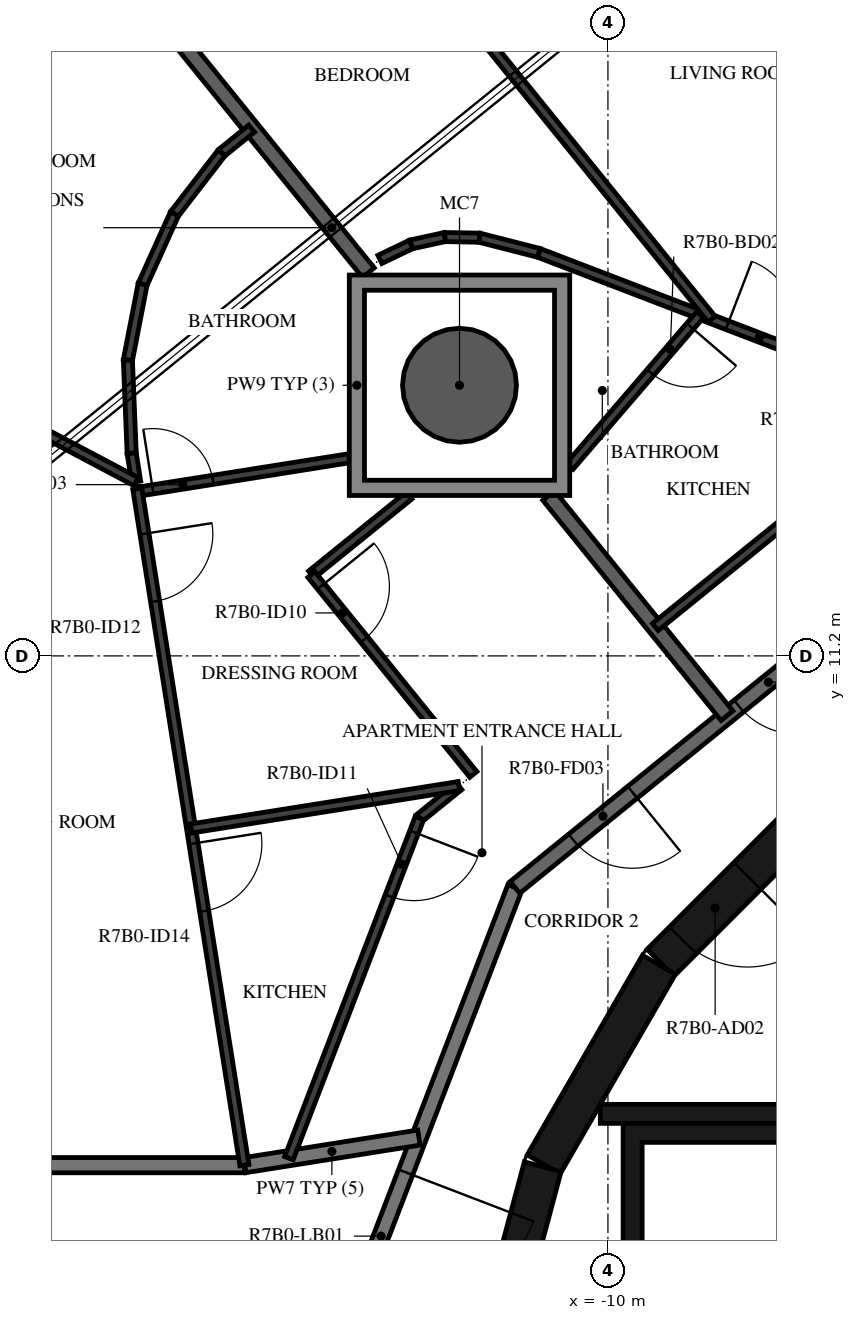
"""IFC4 building model, lengths in metres.
Left out: names, types, materials, properties, quantities, classifications, styles, units other than length and angle.
Written with IfcOpenShell. Run it as: python <this file> out.ifc"""

import sys

from ifc_helpers import new_model, si_unit, direction, frame, frame_2d, origin, origin_2d, place, context, subcontext, project, spatial, polyline, rectangle, hollow_circle, outline, extrude, element, fill, save


model = new_model("IFC4")
c1 = context("Model", 3, precision=1e-05, world=origin(), true_north=direction((0.0, 1.0)))
c2 = subcontext(c1, "Body", "Model", "MODEL_VIEW")
j1 = project(units=[si_unit("LENGTHUNIT", "METRE"), si_unit("PLANEANGLEUNIT", "RADIAN")], contexts=[c1])
p1 = place(None, origin())
s1 = spatial("IfcSite", under=j1, at=p1, CompositionType="ELEMENT")
p2 = place(p1, origin())
s2 = spatial("IfcBuilding", under=s1, at=p2, CompositionType="ELEMENT")
p3 = place(p2, frame((0.0, 0.0, 277.4)))
s3 = spatial("IfcBuildingStorey", under=s2, at=p3, CompositionType="ELEMENT", Elevation=277.4)
p4 = place(p3, frame((-11.953, 14.76, -0.38), z_axis=(0.0, 0.0, 1.0), x_axis=(1.0, 0.0, 0.0)))
e1 = element("IfcColumn", 1, at=p4, inside=s3, PredefinedType="COLUMN", context=c2, shape_type="SweptSolid", body=[
    extrude(hollow_circle(Radius=0.75, WallThickness=0.035, at=origin_2d()), origin(), (0.0, 0.0, 1.0), 3.5),
])
p5 = place(p3, frame((-7.164, 9.308, 0.0), z_axis=(0.0, 0.0, 1.0), x_axis=(-0.707106781187, -0.707106781187, 0.0)))
e2 = element("IfcWall", 2, at=p5, inside=s3, PredefinedType="SHEAR", context=c2, shape_type="SweptSolid", body=[
    extrude(rectangle(XDim=3.032, YDim=0.5, at=frame_2d((1.516, 0.0))), origin(), (0.0, 0.0, 1.0), 3.12),
])
p6 = place(p5, frame((1.416, 0.0, 0.0)))
e3 = element("IfcOpeningElement", 3, at=p6, cuts=e2, PredefinedType="OPENING", context=c2, shape_type="SweptSolid", body=[
    extrude(rectangle(XDim=1.2, YDim=2.1, at=frame_2d((0.6, 1.05))), frame((0.0, 0.26, 0.0), z_axis=(0.0, -1.0, 0.0), x_axis=(1.0, 0.0, 0.0)), (0.0, 0.0, 1.0), 0.52),
])
for number, where, z_axis, x_axis in (
    (4, (-9.329, 7.137, 0.0), (0.0, 0.0, 1.0), (-0.5, -0.866, 0.0)),
    (5, (-10.858, 4.479, 0.0), (0.0, 0.0, 1.0), (-0.259, -0.966, 0.0)),
):
    element("IfcWall", number, at=place(p3, frame(where, z_axis=z_axis, x_axis=x_axis)), inside=s3, PredefinedType="SHEAR", context=c2, shape_type="SweptSolid", body=[
        extrude(rectangle(XDim=3.033, YDim=0.5, at=frame_2d((1.516, 0.0))), origin(), (0.0, 0.0, 1.0), 3.12),
    ])
p7 = place(p3, frame((-7.0, 5.175, 0.0), z_axis=(0.0, 0.0, 1.0), x_axis=(-1.0, 0.0, 0.0)))
e6 = element("IfcWall", 6, at=p7, inside=s3, PredefinedType="SHEAR", context=c2, shape_type="SweptSolid", body=[
    extrude(rectangle(XDim=3.1, YDim=0.25, at=frame_2d((1.55, 0.0))), origin(), (0.0, 0.0, 1.0), 3.12),
])
p8 = place(p3, origin())
e7 = element("IfcWall", 7, at=p8, inside=s3, PredefinedType="SHEAR", context=c2, shape_type="SweptSolid", body=[
    extrude(outline(polyline([(-9.8, 1.9), (-9.55, 1.9), (-9.55, 4.8), (-5.5, 4.8), (-5.5, 1.9), (-5.25, 1.9), (-5.25, 4.8), (3.1, 4.8), (3.1, 1.9), (3.35, 1.9), (3.35, 4.8), (5.25, 4.8), (5.25, 1.9), (5.5, 1.9), (5.5, 4.8), (7.4, 4.8), (7.4, 1.9), (7.65, 1.9), (7.65, 4.8), (9.55, 4.8), (9.55, 1.9), (9.8, 1.9), (9.8, 4.8), (9.8, 5.05), (-9.8, 5.05), (-9.8, 4.8), (-9.8, 1.9)])), origin(), (0.0, 0.0, 1.0), 3.12),
])
p9 = place(p3, frame((-11.223, 8.154, 0.0), z_axis=(0.0, 0.0, 1.0), x_axis=(-0.358341090983, -0.93359073609, 0.0)))
e8 = element("IfcWall", 8, at=p9, inside=s3, PredefinedType="STANDARD", context=c2, shape_type="SweptSolid", body=[
    extrude(rectangle(XDim=7.181, YDim=0.2, at=frame_2d((3.59, 0.0))), origin(), (0.0, 0.0, 1.0), 3.12),
])
p10 = place(p9, frame((4.014, 0.0, 0.0)))
e9 = element("IfcOpeningElement", 9, at=p10, cuts=e8, PredefinedType="OPENING", context=c2, shape_type="SweptSolid", body=[
    extrude(rectangle(XDim=1.8, YDim=2.1, at=frame_2d((0.9, 1.05))), frame((0.0, 0.11, 0.0), z_axis=(0.0, -1.0, 0.0), x_axis=(1.0, 0.0, 0.0)), (0.0, 0.0, 1.0), 0.22),
])
p11 = place(p3, frame((-5.643, 12.673, 0.0), z_axis=(0.0, 0.0, 1.0), x_axis=(-0.777160148113, -0.629302871585, 0.0)))
e10 = element("IfcWall", 10, at=p11, inside=s3, PredefinedType="STANDARD", context=c2, shape_type="SweptSolid", body=[
    extrude(rectangle(XDim=7.181, YDim=0.2, at=frame_2d((3.59, 0.0))), origin(), (0.0, 0.0, 1.0), 3.12),
])
p12 = place(p11, frame((2.39, 0.0, 0.0)))
e11 = element("IfcOpeningElement", 11, at=p12, cuts=e10, PredefinedType="OPENING", context=c2, shape_type="SweptSolid", body=[
    extrude(rectangle(XDim=1.0, YDim=2.1, at=frame_2d((0.5, 1.05))), frame((0.0, 0.11, 0.0), z_axis=(0.0, -1.0, 0.0), x_axis=(1.0, 0.0, 0.0)), (0.0, 0.0, 1.0), 0.22),
])
p13 = place(p11, frame((5.192, 0.0, 0.0)))
e12 = element("IfcOpeningElement", 12, at=p13, cuts=e10, PredefinedType="OPENING", context=c2, shape_type="SweptSolid", body=[
    extrude(rectangle(XDim=1.0, YDim=2.1, at=frame_2d((0.5, 1.05))), frame((0.0, 0.11, 0.0), z_axis=(0.0, -1.0, 0.0), x_axis=(1.0, 0.0, 0.0)), (0.0, 0.0, 1.0), 0.22),
])
p14 = place(p3, frame((-12.487, 4.863, 0.0), z_axis=(0.0, 0.0, 1.0), x_axis=(-0.98769031179, -0.156422018898, 0.0)))
e13 = element("IfcWall", 13, at=p14, inside=s3, PredefinedType="STANDARD", context=c2, shape_type="SweptSolid", body=[
    extrude(rectangle(XDim=2.319, YDim=0.2, at=frame_2d((1.16, 0.0))), origin(), (0.0, 0.0, 1.0), 3.12),
])
p15 = place(p3, frame((-14.783, 4.5, 0.0), z_axis=(0.0, 0.0, 1.0), x_axis=(-1.0, 0.0, 0.0)))
e14 = element("IfcWall", 14, at=p15, inside=s3, PredefinedType="STANDARD", context=c2, shape_type="SweptSolid", body=[
    extrude(rectangle(XDim=3.645, YDim=0.2, at=frame_2d((1.822, 0.0))), origin(), (0.0, 0.0, 1.0), 3.12),
])
p16 = place(p3, frame((-10.779, 13.31, 0.0), z_axis=(0.0, 0.0, 1.0), x_axis=(0.62931692753, -0.777148766147, 0.0)))
e15 = element("IfcWall", 15, at=p16, inside=s3, PredefinedType="STANDARD", context=c2, shape_type="SweptSolid", body=[
    extrude(rectangle(XDim=3.727, YDim=0.2, at=frame_2d((1.864, 0.0))), origin(), (0.0, 0.0, 1.0), 3.12),
])
p17 = place(p3, frame((-16.953, 20.936, 0.0), z_axis=(0.0, 0.0, 1.0), x_axis=(0.629347053134, -0.77712437017, 0.0)))
e16 = element("IfcWall", 16, at=p17, inside=s3, PredefinedType="STANDARD", context=c2, shape_type="SweptSolid", body=[
    extrude(rectangle(XDim=6.04, YDim=0.2, at=frame_2d((3.02, 0.0))), origin(), (0.0, 0.0, 1.0), 3.12),
])
p18 = place(p3, frame((-6.274, 14.092, 0.0), z_axis=(0.0, 0.0, 1.0), x_axis=(-0.777162268892, -0.629300252511, 0.0)))
e17 = element("IfcWall", 17, at=p18, inside=s3, PredefinedType="PARTITIONING", context=c2, shape_type="SweptSolid", body=[
    extrude(rectangle(XDim=3.992, YDim=0.12, at=frame_2d((1.996, 0.0))), origin(), (0.0, 0.0, 1.0), 3.12),
])
p19 = place(p18, frame((0.2, 0.0, 0.0)))
e18 = element("IfcOpeningElement", 18, at=p19, cuts=e17, PredefinedType="OPENING", context=c2, shape_type="SweptSolid", body=[
    extrude(rectangle(XDim=0.9, YDim=2.1, at=frame_2d((0.45, 1.05))), frame((0.0, 0.07, 0.0), z_axis=(0.0, -1.0, 0.0), x_axis=(1.0, 0.0, 0.0)), (0.0, 0.0, 1.0), 0.14),
])
p20 = place(p3, frame((-10.91, 16.502, 0.0), z_axis=(0.0, 0.0, 1.0), x_axis=(0.933584453869, -0.358357457707, 0.0)))
e19 = element("IfcWall", 19, at=p20, inside=s3, PredefinedType="PARTITIONING", context=c2, shape_type="SweptSolid", body=[
    extrude(rectangle(XDim=6.212, YDim=0.12, at=frame_2d((3.106, 0.0))), origin(), (0.0, 0.0, 1.0), 3.12),
])
p21 = place(p20, frame((2.657, 0.0, 0.0)))
e20 = element("IfcOpeningElement", 20, at=p21, cuts=e19, PredefinedType="OPENING", context=c2, shape_type="SweptSolid", body=[
    extrude(rectangle(XDim=0.9, YDim=2.1, at=frame_2d((0.45, 1.05))), frame((0.0, 0.07, 0.0), z_axis=(0.0, -1.0, 0.0), x_axis=(1.0, 0.0, 0.0)), (0.0, 0.0, 1.0), 0.14),
])
p22 = place(p3, frame((-14.132, 22.418, 0.0), z_axis=(0.0, 0.0, 1.0), x_axis=(0.629309172704, -0.77715504576, 0.0)))
e21 = element("IfcWall", 21, at=p22, inside=s3, PredefinedType="PARTITIONING", context=c2, shape_type="SweptSolid", body=[
    extrude(rectangle(XDim=8.736, YDim=0.12, at=frame_2d((4.368, 0.0))), origin(), (0.0, 0.0, 1.0), 3.12),
])
p23 = place(p22, frame((0.4, 0.0, 0.0)))
e22 = element("IfcOpeningElement", 22, at=p23, cuts=e21, PredefinedType="OPENING", context=c2, shape_type="SweptSolid", body=[
    extrude(rectangle(XDim=0.9, YDim=2.1, at=frame_2d((0.45, 1.05))), frame((0.0, 0.07, 0.0), z_axis=(0.0, -1.0, 0.0), x_axis=(1.0, 0.0, 0.0)), (0.0, 0.0, 1.0), 0.14),
])
p24 = place(p3, frame((-8.788, 15.688, 0.0), z_axis=(0.0, 0.0, 1.0), x_axis=(-0.652090514391, -0.758141122115, 0.0)))
e23 = element("IfcWall", 23, at=p24, inside=s3, PredefinedType="PARTITIONING", context=c2, shape_type="SweptSolid", body=[
    extrude(rectangle(XDim=2.629, YDim=0.12, at=frame_2d((1.314, 0.0))), origin(), (0.0, 0.0, 1.0), 3.12),
])
p25 = place(p24, frame((0.2, 0.0, 0.0)))
e24 = element("IfcOpeningElement", 24, at=p25, cuts=e23, PredefinedType="OPENING", context=c2, shape_type="SweptSolid", body=[
    extrude(rectangle(XDim=0.8, YDim=2.1, at=frame_2d((0.4, 1.05))), frame((0.0, 0.07, 0.0), z_axis=(0.0, -1.0, 0.0), x_axis=(1.0, 0.0, 0.0)), (0.0, 0.0, 1.0), 0.14),
])
p26 = place(p3, frame((-10.91, 16.502, 0.0), z_axis=(0.0, 0.0, 1.0), x_axis=(-0.96886520615, 0.247588796823, 0.0)))
e25 = element("IfcWall", 25, at=p26, inside=s3, PredefinedType="PARTITIONING", context=c2, shape_type="SweptSolid", body=[
    extrude(rectangle(XDim=0.807, YDim=0.12, at=frame_2d((0.403, 0.0))), origin(), (0.0, 0.0, 1.0), 3.12),
])
p27 = place(p3, frame((-11.691, 16.702, 0.0), z_axis=(0.0, 0.0, 1.0), x_axis=(-0.999843155249, 0.017710587291, 0.0)))
e26 = element("IfcWall", 26, at=p27, inside=s3, PredefinedType="PARTITIONING", context=c2, shape_type="SweptSolid", body=[
    extrude(rectangle(XDim=0.455, YDim=0.12, at=frame_2d((0.228, 0.0))), origin(), (0.0, 0.0, 1.0), 3.12),
])
p28 = place(p3, frame((-12.146, 16.71, 0.0), z_axis=(0.0, 0.0, 1.0), x_axis=(-0.976826470165, -0.21403281801, 0.0)))
e27 = element("IfcWall", 27, at=p28, inside=s3, PredefinedType="PARTITIONING", context=c2, shape_type="SweptSolid", body=[
    extrude(rectangle(XDim=0.455, YDim=0.12, at=frame_2d((0.228, 0.0))), origin(), (0.0, 0.0, 1.0), 3.12),
])
p29 = place(p3, frame((-12.591, 16.613, 0.0), z_axis=(0.0, 0.0, 1.0), x_axis=(-0.901405666701, -0.432975546699, 0.0)))
e28 = element("IfcWall", 28, at=p29, inside=s3, PredefinedType="PARTITIONING", context=c2, shape_type="SweptSolid", body=[
    extrude(rectangle(XDim=0.455, YDim=0.12, at=frame_2d((0.227, 0.0))), origin(), (0.0, 0.0, 1.0), 3.12),
])
p30 = place(p3, frame((-12.616, 13.311, 0.0), z_axis=(0.0, 0.0, 1.0), x_axis=(-0.7771657422, -0.629295963082, 0.0)))
e29 = element("IfcWall", 29, at=p30, inside=s3, PredefinedType="PARTITIONING", context=c2, shape_type="SweptSolid", body=[
    extrude(rectangle(XDim=1.653, YDim=0.12, at=frame_2d((0.826, 0.0))), origin(), (0.0, 0.0, 1.0), 3.12),
])
p31 = place(p3, frame((-13.901, 12.271, 0.0), z_axis=(0.0, 0.0, 1.0), x_axis=(0.62932066967, -0.777145735835, 0.0)))
e30 = element("IfcWall", 30, at=p31, inside=s3, PredefinedType="PARTITIONING", context=c2, shape_type="SweptSolid", body=[
    extrude(rectangle(XDim=3.384, YDim=0.12, at=frame_2d((1.692, 0.0))), origin(), (0.0, 0.0, 1.0), 3.12),
])
p32 = place(p31, frame((0.2, 0.0, 0.0)))
e31 = element("IfcOpeningElement", 31, at=p32, cuts=e30, PredefinedType="OPENING", context=c2, shape_type="SweptSolid", body=[
    extrude(rectangle(XDim=0.9, YDim=2.1, at=frame_2d((0.45, 1.05))), frame((0.0, 0.07, 0.0), z_axis=(0.0, -1.0, 0.0), x_axis=(1.0, 0.0, 0.0)), (0.0, 0.0, 1.0), 0.14),
])
p33 = place(p3, frame((-11.96, 9.487, 0.0), z_axis=(0.0, 0.0, 1.0), x_axis=(-0.777219341678, -0.62922976322, 0.0)))
e32 = element("IfcWall", 32, at=p33, inside=s3, PredefinedType="PARTITIONING", context=c2, shape_type="SweptSolid", body=[
    extrude(rectangle(XDim=0.668, YDim=0.12, at=frame_2d((0.334, 0.0))), origin(), (0.0, 0.0, 1.0), 3.12),
])
p34 = place(p3, frame((-12.479, 9.067, 0.0), z_axis=(0.0, 0.0, 1.0), x_axis=(-0.358402229057, -0.933567267104, 0.0)))
e33 = element("IfcWall", 33, at=p34, inside=s3, PredefinedType="PARTITIONING", context=c2, shape_type="SweptSolid", body=[
    extrude(rectangle(XDim=4.793, YDim=0.12, at=frame_2d((2.397, 0.0))), origin(), (0.0, 0.0, 1.0), 3.12),
])
p35 = place(p34, frame((0.2, 0.0, 0.0)))
e34 = element("IfcOpeningElement", 34, at=p35, cuts=e33, PredefinedType="OPENING", context=c2, shape_type="SweptSolid", body=[
    extrude(rectangle(XDim=0.9, YDim=2.1, at=frame_2d((0.45, 1.05))), frame((0.0, 0.07, 0.0), z_axis=(0.0, -1.0, 0.0), x_axis=(1.0, 0.0, 0.0)), (0.0, 0.0, 1.0), 0.14),
])
p36 = place(p3, frame((-14.688, 18.138, 0.0), z_axis=(0.0, 0.0, 1.0), x_axis=(-0.777009819755, -0.629488474879, 0.0)))
e35 = element("IfcWall", 35, at=p36, inside=s3, PredefinedType="PARTITIONING", context=c2, shape_type="SweptSolid", body=[
    extrude(rectangle(XDim=0.508, YDim=0.12, at=frame_2d((0.254, 0.0))), origin(), (0.0, 0.0, 1.0), 3.12),
])
p37 = place(p3, frame((-15.083, 17.818, 0.0), z_axis=(0.0, 0.0, 1.0), x_axis=(-0.611091802574, -0.791559731686, 0.0)))
e36 = element("IfcWall", 36, at=p37, inside=s3, PredefinedType="PARTITIONING", context=c2, shape_type="SweptSolid", body=[
    extrude(rectangle(XDim=1.016, YDim=0.12, at=frame_2d((0.508, 0.0))), origin(), (0.0, 0.0, 1.0), 3.12),
])
p38 = place(p3, frame((-15.703, 17.014, 0.0), z_axis=(0.0, 0.0, 1.0), x_axis=(-0.411973085874, -0.911196014322, 0.0)))
e37 = element("IfcWall", 37, at=p38, inside=s3, PredefinedType="PARTITIONING", context=c2, shape_type="SweptSolid", body=[
    extrude(rectangle(XDim=1.016, YDim=0.12, at=frame_2d((0.508, 0.0))), origin(), (0.0, 0.0, 1.0), 3.12),
])
p39 = place(p3, frame((-16.122, 16.088, 0.0), z_axis=(0.0, 0.0, 1.0), x_axis=(-0.191030445301, -0.981584112019, 0.0)))
e38 = element("IfcWall", 38, at=p39, inside=s3, PredefinedType="PARTITIONING", context=c2, shape_type="SweptSolid", body=[
    extrude(rectangle(XDim=1.016, YDim=0.12, at=frame_2d((0.508, 0.0))), origin(), (0.0, 0.0, 1.0), 3.12),
])
p40 = place(p3, frame((-16.316, 15.091, 0.0), z_axis=(0.0, 0.0, 1.0), x_axis=(0.040786423131, -0.999167887639, 0.0)))
e39 = element("IfcWall", 39, at=p40, inside=s3, PredefinedType="PARTITIONING", context=c2, shape_type="SweptSolid", body=[
    extrude(rectangle(XDim=1.227, YDim=0.12, at=frame_2d((0.614, 0.0))), origin(), (0.0, 0.0, 1.0), 3.12),
])
p41 = place(p3, frame((-16.266, 13.865, 0.0), z_axis=(0.0, 0.0, 1.0), x_axis=(0.156757556272, -0.987637113798, 0.0)))
e40 = element("IfcWall", 40, at=p41, inside=s3, PredefinedType="PARTITIONING", context=c2, shape_type="SweptSolid", body=[
    extrude(rectangle(XDim=0.378, YDim=0.12, at=frame_2d((0.189, 0.0))), origin(), (0.0, 0.0, 1.0), 3.12),
])
p42 = place(p3, frame((-16.186, 13.359, 0.0), z_axis=(0.0, 0.0, 1.0), x_axis=(0.987680631298, 0.156483131865, 0.0)))
e41 = element("IfcWall", 41, at=p42, inside=s3, PredefinedType="PARTITIONING", context=c2, shape_type="SweptSolid", body=[
    extrude(rectangle(XDim=2.818, YDim=0.12, at=frame_2d((1.409, 0.0))), origin(), (0.0, 0.0, 1.0), 3.12),
])
p43 = place(p42, frame((0.2, 0.0, 0.0)))
e42 = element("IfcOpeningElement", 42, at=p43, cuts=e41, PredefinedType="OPENING", context=c2, shape_type="SweptSolid", body=[
    extrude(rectangle(XDim=0.8, YDim=2.1, at=frame_2d((0.4, 1.05))), frame((0.0, 0.07, 0.0), z_axis=(0.0, -1.0, 0.0), x_axis=(1.0, 0.0, 0.0)), (0.0, 0.0, 1.0), 0.14),
])
p44 = place(p3, frame((-19.913, 15.454, 0.0), z_axis=(0.0, 0.0, 1.0), x_axis=(0.883751094582, -0.467957266024, 0.0)))
e43 = element("IfcWall", 43, at=p44, inside=s3, PredefinedType="PARTITIONING", context=c2, shape_type="SweptSolid", body=[
    extrude(rectangle(XDim=4.194, YDim=0.12, at=frame_2d((2.097, 0.0))), origin(), (0.0, 0.0, 1.0), 3.12),
])
p45 = place(p44, frame((0.4, 0.0, 0.0)))
e44 = element("IfcOpeningElement", 44, at=p45, cuts=e43, PredefinedType="OPENING", context=c2, shape_type="SweptSolid", body=[
    extrude(rectangle(XDim=0.9, YDim=2.1, at=frame_2d((0.45, 1.05))), frame((0.0, 0.07, 0.0), z_axis=(0.0, -1.0, 0.0), x_axis=(1.0, 0.0, 0.0)), (0.0, 0.0, 1.0), 0.14),
])
p46 = place(p3, frame((-16.192, 13.399, 0.0), z_axis=(0.0, 0.0, 1.0), x_axis=(0.156405047803, -0.987692999379, 0.0)))
e45 = element("IfcWall", 45, at=p46, inside=s3, PredefinedType="PARTITIONING", context=c2, shape_type="SweptSolid", body=[
    extrude(rectangle(XDim=9.01, YDim=0.12, at=frame_2d((4.505, 0.0))), origin(), (0.0, 0.0, 1.0), 3.12),
])
p47 = place(p46, frame((0.6, 0.0, 0.0)))
e46 = element("IfcOpeningElement", 46, at=p47, cuts=e45, PredefinedType="OPENING", context=c2, shape_type="SweptSolid", body=[
    extrude(rectangle(XDim=0.9, YDim=2.1, at=frame_2d((0.45, 1.05))), frame((0.0, 0.07, 0.0), z_axis=(0.0, -1.0, 0.0), x_axis=(1.0, 0.0, 0.0)), (0.0, 0.0, 1.0), 0.14),
])
p48 = place(p46, frame((4.725, 0.0, 0.0)))
e47 = element("IfcOpeningElement", 47, at=p48, cuts=e45, PredefinedType="OPENING", context=c2, shape_type="SweptSolid", body=[
    extrude(rectangle(XDim=0.9, YDim=2.1, at=frame_2d((0.45, 1.05))), frame((0.0, 0.07, 0.0), z_axis=(0.0, -1.0, 0.0), x_axis=(1.0, 0.0, 0.0)), (0.0, 0.0, 1.0), 0.14),
])
p49 = place(p3, frame((-15.484, 8.929, 0.0), z_axis=(0.0, 0.0, 1.0), x_axis=(0.987689619983, 0.156426387092, 0.0)))
e48 = element("IfcWall", 48, at=p49, inside=s3, PredefinedType="PARTITIONING", context=c2, shape_type="SweptSolid", body=[
    extrude(rectangle(XDim=3.568, YDim=0.12, at=frame_2d((1.784, 0.0))), origin(), (0.0, 0.0, 1.0), 3.12),
])
p50 = place(p3, origin())
e49 = element("IfcWall", 49, at=p50, inside=s3, PredefinedType="STANDARD", context=c2, shape_type="SweptSolid", body=[
    extrude(outline(polyline([(-10.503, 16.21), (-10.503, 13.311), (-13.403, 13.311), (-13.403, 16.21), (-10.503, 16.21)]), holes=[polyline([(-13.203, 13.51), (-10.703, 13.51), (-10.703, 16.01), (-13.203, 16.01), (-13.203, 13.51)])]), origin(), (0.0, 0.0, 1.0), 3.12),
])
p51 = place(p6, origin())
e50 = element("IfcDoor", 50, at=p51, inside=s3, OperationType="SINGLE_SWING_RIGHT", PredefinedType="DOOR", context=c2, shape_type="SweptSolid", body=[
    extrude(rectangle(XDim=1.2, YDim=2.1, at=frame_2d((0.6, 1.05))), frame((0.0, 0.025, 0.0), z_axis=(0.0, -1.0, 0.0), x_axis=(1.0, 0.0, 0.0)), (0.0, 0.0, 1.0), 0.05),
])
fill(e3, e50)
p52 = place(p12, origin())
e51 = element("IfcDoor", 51, at=p52, inside=s3, OperationType="SINGLE_SWING_RIGHT", PredefinedType="DOOR", context=c2, shape_type="SweptSolid", body=[
    extrude(rectangle(XDim=1.0, YDim=2.1, at=frame_2d((0.5, 1.05))), frame((0.0, 0.025, 0.0), z_axis=(0.0, -1.0, 0.0), x_axis=(1.0, 0.0, 0.0)), (0.0, 0.0, 1.0), 0.05),
])
fill(e11, e51)
p53 = place(p25, origin())
e52 = element("IfcDoor", 52, at=p53, inside=s3, OperationType="SINGLE_SWING_RIGHT", PredefinedType="DOOR", context=c2, shape_type="SweptSolid", body=[
    extrude(rectangle(XDim=0.8, YDim=2.1, at=frame_2d((0.4, 1.05))), frame((0.0, 0.025, 0.0), z_axis=(0.0, -1.0, 0.0), x_axis=(1.0, 0.0, 0.0)), (0.0, 0.0, 1.0), 0.05),
])
fill(e24, e52)
p54 = place(p21, origin())
e53 = element("IfcDoor", 53, at=p54, inside=s3, OperationType="SINGLE_SWING_LEFT", PredefinedType="DOOR", context=c2, shape_type="SweptSolid", body=[
    extrude(rectangle(XDim=0.9, YDim=2.1, at=frame_2d((0.45, 1.05))), frame((0.0, 0.025, 0.0), z_axis=(0.0, -1.0, 0.0), x_axis=(1.0, 0.0, 0.0)), (0.0, 0.0, 1.0), 0.05),
])
fill(e20, e53)
p55 = place(p13, origin())
e54 = element("IfcDoor", 54, at=p55, inside=s3, OperationType="SINGLE_SWING_LEFT", PredefinedType="DOOR", context=c2, shape_type="SweptSolid", body=[
    extrude(rectangle(XDim=1.0, YDim=2.1, at=frame_2d((0.5, 1.05))), frame((0.0, 0.025, 0.0), z_axis=(0.0, -1.0, 0.0), x_axis=(1.0, 0.0, 0.0)), (0.0, 0.0, 1.0), 0.05),
])
fill(e12, e54)
p56 = place(p32, origin())
e55 = element("IfcDoor", 55, at=p56, inside=s3, OperationType="SINGLE_SWING_LEFT", PredefinedType="DOOR", context=c2, shape_type="SweptSolid", body=[
    extrude(rectangle(XDim=0.9, YDim=2.1, at=frame_2d((0.45, 1.05))), frame((0.0, 0.025, 0.0), z_axis=(0.0, -1.0, 0.0), x_axis=(1.0, 0.0, 0.0)), (0.0, 0.0, 1.0), 0.05),
])
fill(e31, e55)
p57 = place(p35, origin())
e56 = element("IfcDoor", 56, at=p57, inside=s3, OperationType="SINGLE_SWING_LEFT", PredefinedType="DOOR", context=c2, shape_type="SweptSolid", body=[
    extrude(rectangle(XDim=0.9, YDim=2.1, at=frame_2d((0.45, 1.05))), frame((0.0, 0.025, 0.0), z_axis=(0.0, -1.0, 0.0), x_axis=(1.0, 0.0, 0.0)), (0.0, 0.0, 1.0), 0.05),
])
fill(e34, e56)
p58 = place(p43, origin())
e57 = element("IfcDoor", 57, at=p58, inside=s3, OperationType="SINGLE_SWING_LEFT", PredefinedType="DOOR", context=c2, shape_type="SweptSolid", body=[
    extrude(rectangle(XDim=0.8, YDim=2.1, at=frame_2d((0.4, 1.05))), frame((0.0, 0.025, 0.0), z_axis=(0.0, -1.0, 0.0), x_axis=(1.0, 0.0, 0.0)), (0.0, 0.0, 1.0), 0.05),
])
fill(e42, e57)
p59 = place(p47, origin())
e58 = element("IfcDoor", 58, at=p59, inside=s3, OperationType="SINGLE_SWING_LEFT", PredefinedType="DOOR", context=c2, shape_type="SweptSolid", body=[
    extrude(rectangle(XDim=0.9, YDim=2.1, at=frame_2d((0.45, 1.05))), frame((0.0, 0.025, 0.0), z_axis=(0.0, -1.0, 0.0), x_axis=(1.0, 0.0, 0.0)), (0.0, 0.0, 1.0), 0.05),
])
fill(e46, e58)
p60 = place(p48, origin())
e59 = element("IfcDoor", 59, at=p60, inside=s3, OperationType="SINGLE_SWING_RIGHT", PredefinedType="DOOR", context=c2, shape_type="SweptSolid", body=[
    extrude(rectangle(XDim=0.9, YDim=2.1, at=frame_2d((0.45, 1.05))), frame((0.0, 0.025, 0.0), z_axis=(0.0, -1.0, 0.0), x_axis=(1.0, 0.0, 0.0)), (0.0, 0.0, 1.0), 0.05),
])
fill(e47, e59)
p61 = place(p10, origin())
e60 = element("IfcDoor", 60, at=p61, inside=s3, OperationType="DOUBLE_DOOR_SINGLE_SWING", PredefinedType="DOOR", context=c2, shape_type="SweptSolid", body=[
    extrude(rectangle(XDim=1.8, YDim=2.1, at=frame_2d((0.9, 1.05))), frame((0.0, 0.025, 0.0), z_axis=(0.0, -1.0, 0.0), x_axis=(1.0, 0.0, 0.0)), (0.0, 0.0, 1.0), 0.05),
])
fill(e9, e60)
save(model, sys.argv[1])
